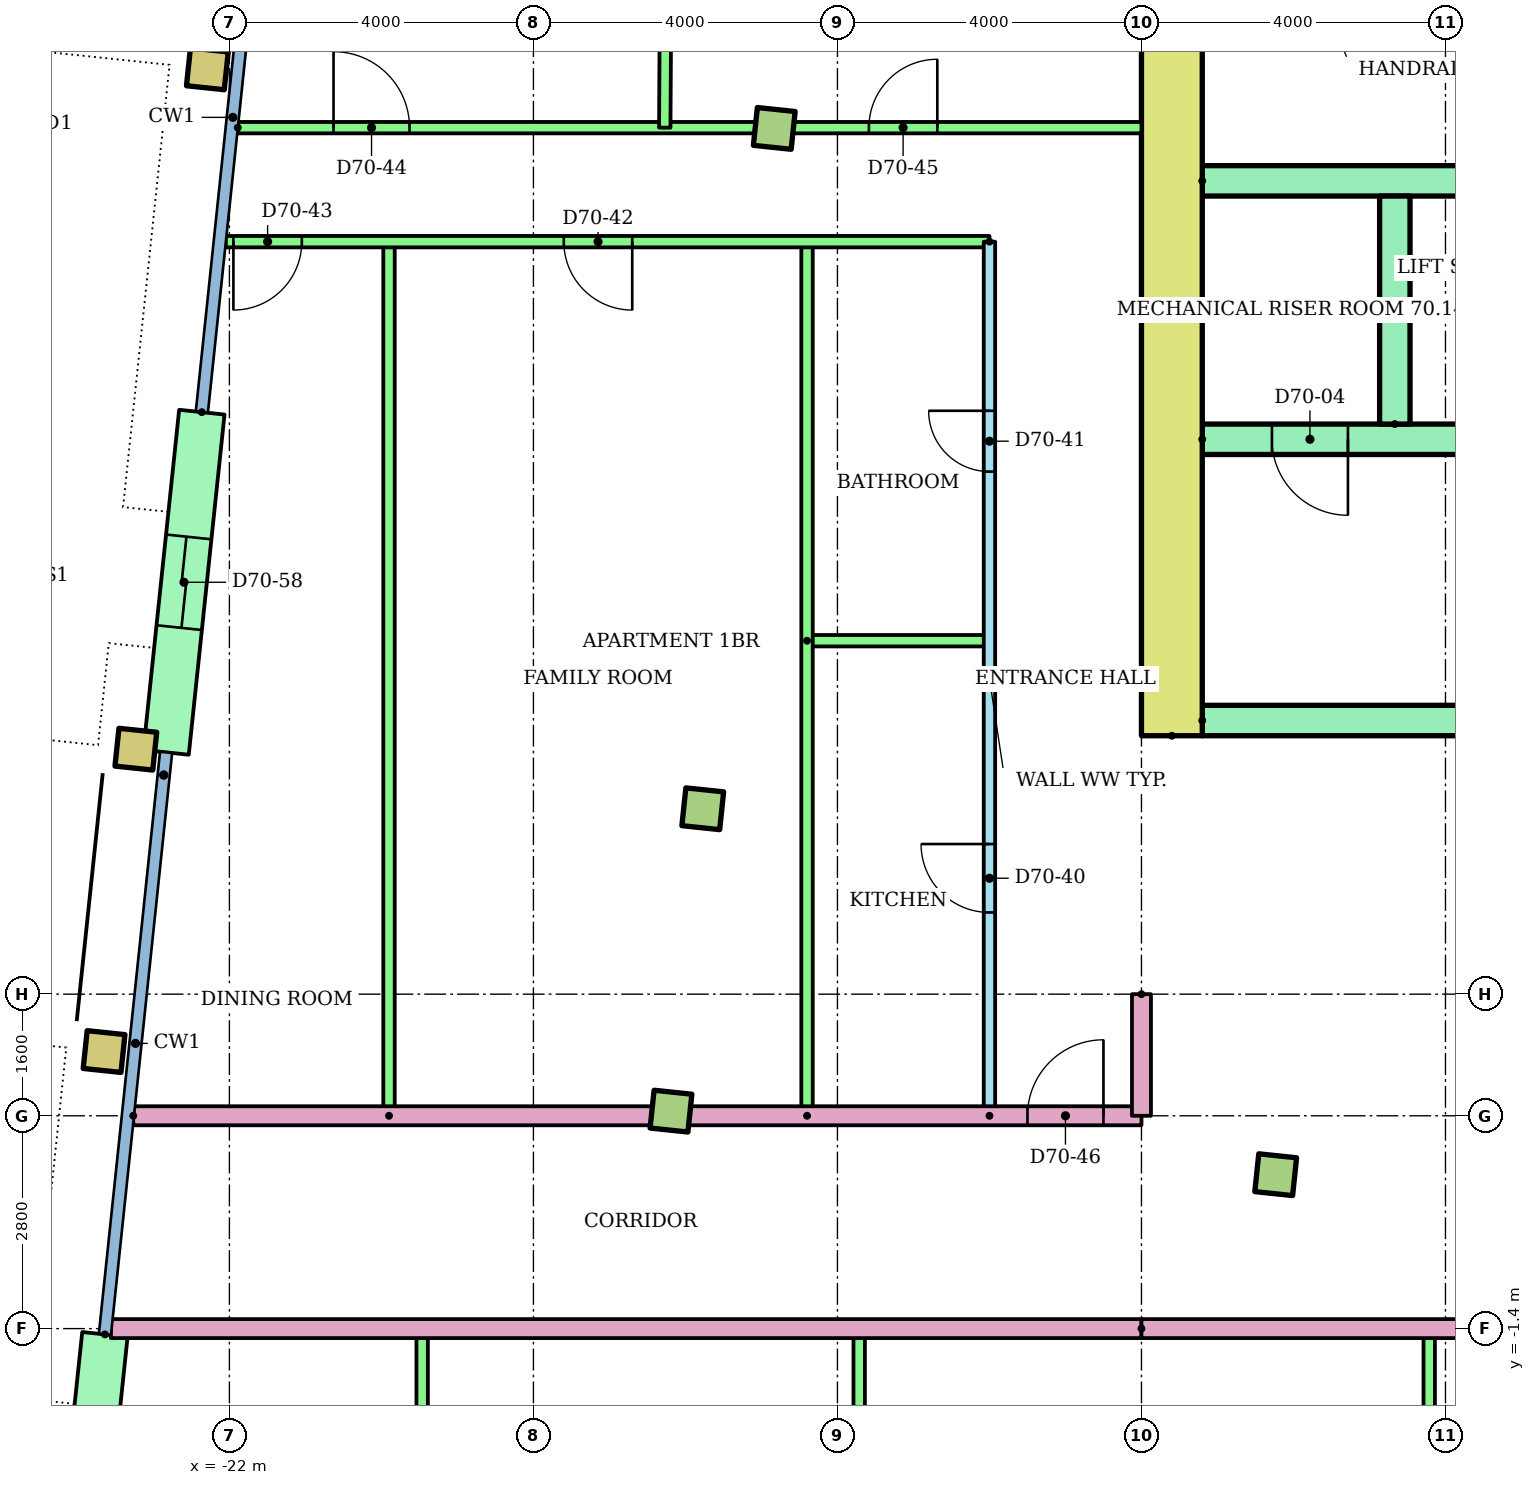
"""IFC4 building model, lengths in metres.
Left out: names, types, materials, properties, quantities, classifications, styles, units other than length and angle.
Written with IfcOpenShell. Run it as: python <this file> out.ifc"""

import sys

from ifc_helpers import new_model, si_unit, direction, frame, frame_2d, origin, origin_2d, place, context, subcontext, project, spatial, rectangle, hollow_rectangle, extrude, element, fill, save


model = new_model("IFC4")
c1 = context("Model", 3, precision=1e-05, world=origin(), true_north=direction((0.0, 1.0)))
c2 = subcontext(c1, "Body", "Model", "MODEL_VIEW")
j1 = project(units=[si_unit("LENGTHUNIT", "METRE"), si_unit("PLANEANGLEUNIT", "RADIAN")], contexts=[c1])
p1 = place(None, origin())
s1 = spatial("IfcSite", under=j1, at=p1, CompositionType="ELEMENT")
p2 = place(p1, origin())
s2 = spatial("IfcBuilding", under=s1, at=p2, CompositionType="ELEMENT")
p3 = place(p2, frame((0.0, 0.0, 269.1)))
s3 = spatial("IfcBuildingStorey", under=s2, at=p3, CompositionType="ELEMENT", Elevation=269.1)
p4 = place(p3, frame((-23.649, 2.245, 0.0), z_axis=(0.0, 0.0, 1.0), x_axis=(0.994521895368, -0.104528463268, 0.0)))
e1 = element("IfcColumn", 1, at=p4, inside=s3, PredefinedType="COLUMN", context=c2, shape_type="SweptSolid", body=[
    extrude(hollow_rectangle(XDim=0.5, YDim=0.5, WallThickness=0.025, at=origin_2d()), origin(), (0.0, 0.0, 1.0), 3.2),
])
for number, where, z_axis, x_axis in (
    (2, (-16.19, 1.461, 0.0), (0.0, 0.0, 1.0), (0.995, -0.105, 0.0)),
    (3, (-8.234, 0.625, 0.0), (0.0, 0.0, 1.0), (0.995, -0.105, 0.0)),
):
    element("IfcColumn", number, at=place(p3, frame(where, z_axis=z_axis, x_axis=x_axis)), inside=s3, PredefinedType="COLUMN", context=c2, shape_type="SweptSolid", body=[
        extrude(rectangle(XDim=0.5, YDim=0.5, at=origin_2d()), origin(), (0.0, 0.0, 1.0), 3.2),
    ])
p5 = place(p3, frame((-23.231, 6.223, 0.0), z_axis=(0.0, 0.0, 1.0), x_axis=(0.994521895368, -0.104528463268, 0.0)))
e4 = element("IfcColumn", 4, at=p5, inside=s3, PredefinedType="COLUMN", context=c2, shape_type="SweptSolid", body=[
    extrude(hollow_rectangle(XDim=0.5, YDim=0.5, WallThickness=0.025, at=origin_2d()), origin(), (0.0, 0.0, 1.0), 3.2),
])
p6 = place(p3, frame((-15.772, 5.439, 0.0), z_axis=(0.0, 0.0, 1.0), x_axis=(0.994521895368, -0.104528463268, 0.0)))
e5 = element("IfcColumn", 5, at=p6, inside=s3, PredefinedType="COLUMN", context=c2, shape_type="SweptSolid", body=[
    extrude(rectangle(XDim=0.5, YDim=0.5, at=origin_2d()), origin(), (0.0, 0.0, 1.0), 3.2),
])
p7 = place(p3, frame((-22.29, 15.174, 0.0), z_axis=(0.0, 0.0, 1.0), x_axis=(0.994521895368, -0.104528463268, 0.0)))
e6 = element("IfcColumn", 6, at=p7, inside=s3, PredefinedType="COLUMN", context=c2, shape_type="SweptSolid", body=[
    extrude(hollow_rectangle(XDim=0.5, YDim=0.5, WallThickness=0.025, at=origin_2d()), origin(), (0.0, 0.0, 1.0), 3.2),
])
p8 = place(p3, frame((-14.831, 14.39, 0.0), z_axis=(0.0, 0.0, 1.0), x_axis=(0.994521895368, -0.104528463268, 0.0)))
e7 = element("IfcColumn", 7, at=p8, inside=s3, PredefinedType="COLUMN", context=c2, shape_type="SweptSolid", body=[
    extrude(rectangle(XDim=0.5, YDim=0.5, at=origin_2d()), origin(), (0.0, 0.0, 1.0), 3.2),
])
p9 = place(p3, frame((-22.363, 10.657, 0.0), z_axis=(0.0, 0.0, 1.0), x_axis=(-0.104492739125, -0.994525649478, 0.0)))
e8 = element("IfcWall", 8, at=p9, inside=s3, PredefinedType="STANDARD", context=c2, shape_type="SweptSolid", body=[
    extrude(rectangle(XDim=4.5, YDim=0.6, at=frame_2d((2.25, 0.0))), origin(), (0.0, 0.0, 1.0), 2.92),
])
p10 = place(p9, frame((1.65, 0.0, 0.0)))
e9 = element("IfcOpeningElement", 9, at=p10, cuts=e8, PredefinedType="OPENING", context=c2, shape_type="SweptSolid", body=[
    extrude(rectangle(XDim=1.2, YDim=2.1, at=frame_2d((0.6, 1.05))), frame((0.0, 0.31, 0.0), z_axis=(0.0, -1.0, 0.0), x_axis=(1.0, 0.0, 0.0)), (0.0, 0.0, 1.0), 0.62),
])
p11 = place(p3, frame((-23.638, -1.476, 0.0), z_axis=(0.0, 0.0, 1.0), x_axis=(-0.104513052986, -0.994523514933, 0.0)))
e10 = element("IfcWall", 10, at=p11, inside=s3, PredefinedType="STANDARD", context=c2, shape_type="SweptSolid", body=[
    extrude(rectangle(XDim=3.7, YDim=0.6, at=frame_2d((1.85, 0.0))), origin(), (0.0, 0.0, 1.0), 2.92),
])
p12 = place(p11, frame((1.25, 0.0, 0.0)))
e11 = element("IfcOpeningElement", 11, at=p12, cuts=e10, PredefinedType="OPENING", context=c2, shape_type="SweptSolid", body=[
    extrude(rectangle(XDim=1.2, YDim=2.1, at=frame_2d((0.6, 1.05))), frame((0.0, 0.31, 0.0), z_axis=(0.0, -1.0, 0.0), x_axis=(1.0, 0.0, 0.0)), (0.0, 0.0, 1.0), 0.62),
])
p13 = place(p3, frame((-9.6, 6.4, 0.0), z_axis=(0.0, 0.0, 1.0), x_axis=(0.0, 1.0, 0.0)))
e12 = element("IfcWall", 12, at=p13, inside=s3, PredefinedType="SHEAR", context=c2, shape_type="SweptSolid", body=[
    extrude(rectangle(XDim=13.6, YDim=0.8, at=frame_2d((6.8, 0.0))), origin(), (0.0, 0.0, 1.0), 2.92),
])
p14 = place(p3, frame((-9.2, 6.6, 0.0)))
e13 = element("IfcWall", 13, at=p14, inside=s3, PredefinedType="SHEAR", context=c2, shape_type="SweptSolid", body=[
    extrude(rectangle(XDim=18.4, YDim=0.4, at=frame_2d((9.2, 0.0))), origin(), (0.0, 0.0, 1.0), 2.92),
])
p15 = place(p14, frame((8.3, 0.0, 0.0)))
e14 = element("IfcOpeningElement", 14, at=p15, cuts=e13, PredefinedType="OPENING", context=c2, shape_type="SweptSolid", body=[
    extrude(rectangle(XDim=1.8, YDim=2.1, at=frame_2d((0.9, 1.05))), frame((0.0, 0.21, 0.0), z_axis=(0.0, -1.0, 0.0), x_axis=(1.0, 0.0, 0.0)), (0.0, 0.0, 1.0), 0.42),
])
p16 = place(p14, frame((3.8, 0.0, 0.0)))
e15 = element("IfcOpeningElement", 15, at=p16, cuts=e13, PredefinedType="OPENING", context=c2, shape_type="SweptSolid", body=[
    extrude(rectangle(XDim=1.8, YDim=2.1, at=frame_2d((0.9, 1.05))), frame((0.0, 0.21, 0.0), z_axis=(0.0, -1.0, 0.0), x_axis=(1.0, 0.0, 0.0)), (0.0, 0.0, 1.0), 0.42),
])
p17 = place(p14, frame((12.8, 0.0, 0.0)))
e16 = element("IfcOpeningElement", 16, at=p17, cuts=e13, PredefinedType="OPENING", context=c2, shape_type="SweptSolid", body=[
    extrude(rectangle(XDim=1.8, YDim=2.1, at=frame_2d((0.9, 1.05))), frame((0.0, 0.21, 0.0), z_axis=(0.0, -1.0, 0.0), x_axis=(1.0, 0.0, 0.0)), (0.0, 0.0, 1.0), 0.42),
])
p18 = place(p3, frame((-9.2, 10.3, 0.0)))
e17 = element("IfcWall", 17, at=p18, inside=s3, PredefinedType="SHEAR", context=c2, shape_type="SweptSolid", body=[
    extrude(rectangle(XDim=8.0, YDim=0.4, at=frame_2d((4.0, 0.0))), origin(), (0.0, 0.0, 1.0), 2.92),
])
p19 = place(p18, frame((3.35, 0.0, 0.0)))
e18 = element("IfcOpeningElement", 18, at=p19, cuts=e17, PredefinedType="OPENING", context=c2, shape_type="SweptSolid", body=[
    extrude(rectangle(XDim=1.1, YDim=2.1, at=frame_2d((0.55, 1.05))), frame((0.0, 0.21, 0.0), z_axis=(0.0, -1.0, 0.0), x_axis=(1.0, 0.0, 0.0)), (0.0, 0.0, 1.0), 0.42),
])
p20 = place(p18, frame((6.083, 0.0, 0.0)))
e19 = element("IfcOpeningElement", 19, at=p20, cuts=e17, PredefinedType="OPENING", context=c2, shape_type="SweptSolid", body=[
    extrude(rectangle(XDim=1.1, YDim=2.1, at=frame_2d((0.55, 1.05))), frame((0.0, 0.21, 0.0), z_axis=(0.0, -1.0, 0.0), x_axis=(1.0, 0.0, 0.0)), (0.0, 0.0, 1.0), 0.42),
])
p21 = place(p18, frame((0.917, 0.0, 0.0)))
e20 = element("IfcOpeningElement", 20, at=p21, cuts=e17, PredefinedType="OPENING", context=c2, shape_type="SweptSolid", body=[
    extrude(rectangle(XDim=1.0, YDim=2.1, at=frame_2d((0.5, 1.05))), frame((0.0, 0.21, 0.0), z_axis=(0.0, -1.0, 0.0), x_axis=(1.0, 0.0, 0.0)), (0.0, 0.0, 1.0), 0.42),
])
p22 = place(p3, frame((-9.2, 13.7, 0.0)))
e21 = element("IfcWall", 21, at=p22, inside=s3, PredefinedType="SHEAR", context=c2, shape_type="SweptSolid", body=[
    extrude(rectangle(XDim=8.0, YDim=0.4, at=frame_2d((4.0, 0.0))), origin(), (0.0, 0.0, 1.0), 2.92),
])
p23 = place(p3, frame((-6.667, 10.5, 0.0), z_axis=(0.0, 0.0, 1.0), x_axis=(0.0, 1.0, 0.0)))
e22 = element("IfcWall", 22, at=p23, inside=s3, PredefinedType="SHEAR", context=c2, shape_type="SweptSolid", body=[
    extrude(rectangle(XDim=3.0, YDim=0.4, at=frame_2d((1.5, 0.0))), origin(), (0.0, 0.0, 1.0), 2.92),
])
for number, where, z_axis, x_axis in (
    (23, (-6.214, -7.047, 0.0), (0.0, 0.0, 1.0), (0.0, 1.0, 0.0)),
    (24, (-13.714, -7.047, 0.0), (0.0, 0.0, 1.0), (0.0, 1.0, 0.0)),
    (25, (-19.464, -7.047, 0.0), (0.0, 0.0, 1.0), (0.0, 1.0, 0.0)),
):
    element("IfcWall", number, at=place(p3, frame(where, z_axis=z_axis, x_axis=x_axis)), inside=s3, PredefinedType="PARTITIONING", context=c2, shape_type="SweptSolid", body=[
        extrude(rectangle(XDim=5.647, YDim=0.15, at=frame_2d((2.823, 0.0))), origin(), (0.0, 0.0, 1.0), 2.4),
    ])
p24 = place(p3, frame((-10.0, -1.4, 0.0), z_axis=(0.0, 0.0, 1.0), x_axis=(-1.0, 0.0, 0.0)))
e26 = element("IfcWall", 26, at=p24, inside=s3, PredefinedType="PARTITIONING", context=c2, shape_type="SweptSolid", body=[
    extrude(rectangle(XDim=13.56, YDim=0.25, at=frame_2d((6.78, 0.0))), origin(), (0.0, 0.0, 1.0), 2.4),
])
p25 = place(p3, frame((-12.0, 1.4, 0.0), z_axis=(0.0, 0.0, 1.0), x_axis=(0.0, 1.0, 0.0)))
e27 = element("IfcWall", 27, at=p25, inside=s3, PredefinedType="PARTITIONING", context=c2, shape_type="SweptSolid", body=[
    extrude(rectangle(XDim=11.5, YDim=0.15, at=frame_2d((5.75, 0.0))), origin(), (0.0, 0.0, 1.0), 2.4),
])
p26 = place(p25, frame((2.675, 0.0, 0.0)))
e28 = element("IfcOpeningElement", 28, at=p26, cuts=e27, PredefinedType="OPENING", context=c2, shape_type="SweptSolid", body=[
    extrude(rectangle(XDim=0.9, YDim=2.1, at=frame_2d((0.45, 1.05))), frame((0.0, 0.085, 0.0), z_axis=(0.0, -1.0, 0.0), x_axis=(1.0, 0.0, 0.0)), (0.0, 0.0, 1.0), 0.17),
])
p27 = place(p25, frame((8.475, 0.0, 0.0)))
e29 = element("IfcOpeningElement", 29, at=p27, cuts=e27, PredefinedType="OPENING", context=c2, shape_type="SweptSolid", body=[
    extrude(rectangle(XDim=0.8, YDim=2.1, at=frame_2d((0.4, 1.05))), frame((0.0, 0.085, 0.0), z_axis=(0.0, -1.0, 0.0), x_axis=(1.0, 0.0, 0.0)), (0.0, 0.0, 1.0), 0.17),
])
p28 = place(p3, frame((-14.4, 7.65, 0.0)))
e30 = element("IfcWall", 30, at=p28, inside=s3, PredefinedType="PARTITIONING", context=c2, shape_type="SweptSolid", body=[
    extrude(rectangle(XDim=2.4, YDim=0.15, at=frame_2d((1.2, 0.0))), origin(), (0.0, 0.0, 1.0), 2.4),
])
for number, where, z_axis, x_axis in (
    (31, (-14.4, 1.4, 0.0), (0.0, 0.0, 1.0), (0.0, 1.0, 0.0)),
    (32, (-19.9, 1.4, 0.0), (0.0, 0.0, 1.0), (0.0, 1.0, 0.0)),
):
    element("IfcWall", number, at=place(p3, frame(where, z_axis=z_axis, x_axis=x_axis)), inside=s3, PredefinedType="PARTITIONING", context=c2, shape_type="SweptSolid", body=[
        extrude(rectangle(XDim=11.5, YDim=0.15, at=frame_2d((5.75, 0.0))), origin(), (0.0, 0.0, 1.0), 2.4),
    ])
p29 = place(p3, frame((-12.0, 12.9, 0.0), z_axis=(0.0, 0.0, 1.0), x_axis=(-1.0, 0.0, 0.0)))
e33 = element("IfcWall", 33, at=p29, inside=s3, PredefinedType="PARTITIONING", context=c2, shape_type="SweptSolid", body=[
    extrude(rectangle(XDim=10.047, YDim=0.15, at=frame_2d((5.024, 0.0))), origin(), (0.0, 0.0, 1.0), 2.4),
])
p30 = place(p29, frame((4.7, 0.0, 0.0)))
e34 = element("IfcOpeningElement", 34, at=p30, cuts=e33, PredefinedType="OPENING", context=c2, shape_type="SweptSolid", body=[
    extrude(rectangle(XDim=0.9, YDim=2.1, at=frame_2d((0.45, 1.05))), frame((0.0, 0.085, 0.0), z_axis=(0.0, -1.0, 0.0), x_axis=(1.0, 0.0, 0.0)), (0.0, 0.0, 1.0), 0.17),
])
p31 = place(p29, frame((9.047, 0.0, 0.0)))
e35 = element("IfcOpeningElement", 35, at=p31, cuts=e33, PredefinedType="OPENING", context=c2, shape_type="SweptSolid", body=[
    extrude(rectangle(XDim=0.9, YDim=2.1, at=frame_2d((0.45, 1.05))), frame((0.0, 0.085, 0.0), z_axis=(0.0, -1.0, 0.0), x_axis=(1.0, 0.0, 0.0)), (0.0, 0.0, 1.0), 0.17),
])
p32 = place(p3, frame((-21.89, 14.4, 0.0)))
e36 = element("IfcWall", 36, at=p32, inside=s3, PredefinedType="PARTITIONING", context=c2, shape_type="SweptSolid", body=[
    extrude(rectangle(XDim=11.89, YDim=0.15, at=frame_2d((5.945, 0.0))), origin(), (0.0, 0.0, 1.0), 2.4),
])
p33 = place(p32, frame((1.26, 0.0, 0.0)))
e37 = element("IfcOpeningElement", 37, at=p33, cuts=e36, PredefinedType="OPENING", context=c2, shape_type="SweptSolid", body=[
    extrude(rectangle(XDim=1.0, YDim=2.1, at=frame_2d((0.5, 1.05))), frame((0.0, 0.085, 0.0), z_axis=(0.0, -1.0, 0.0), x_axis=(1.0, 0.0, 0.0)), (0.0, 0.0, 1.0), 0.17),
])
p34 = place(p32, frame((8.304, 0.0, 0.0)))
e38 = element("IfcOpeningElement", 38, at=p34, cuts=e36, PredefinedType="OPENING", context=c2, shape_type="SweptSolid", body=[
    extrude(rectangle(XDim=0.9, YDim=2.1, at=frame_2d((0.45, 1.05))), frame((0.0, 0.085, 0.0), z_axis=(0.0, -1.0, 0.0), x_axis=(1.0, 0.0, 0.0)), (0.0, 0.0, 1.0), 0.17),
])
p35 = place(p3, frame((-16.222, 22.61, 0.0), z_axis=(0.0, 0.0, 1.0), x_axis=(-0.006095634594, -0.999981421447, 0.0)))
e39 = element("IfcWall", 39, at=p35, inside=s3, PredefinedType="PARTITIONING", context=c2, shape_type="SweptSolid", body=[
    extrude(rectangle(XDim=8.211, YDim=0.15, at=frame_2d((4.105, 0.0))), origin(), (0.0, 0.0, 1.0), 2.4),
])
p36 = place(p3, frame((-23.265, 1.4, 0.0)))
e40 = element("IfcWall", 40, at=p36, inside=s3, PredefinedType="PARTITIONING", context=c2, shape_type="SweptSolid", body=[
    extrude(rectangle(XDim=13.265, YDim=0.25, at=frame_2d((6.633, 0.0))), origin(), (0.0, 0.0, 1.0), 2.4),
])
p37 = place(p36, frame((11.765, 0.0, 0.0)))
e41 = element("IfcOpeningElement", 41, at=p37, cuts=e40, PredefinedType="OPENING", context=c2, shape_type="SweptSolid", body=[
    extrude(rectangle(XDim=1.0, YDim=2.1, at=frame_2d((0.5, 1.05))), frame((0.0, 0.135, 0.0), z_axis=(0.0, -1.0, 0.0), x_axis=(1.0, 0.0, 0.0)), (0.0, 0.0, 1.0), 0.27),
])
p38 = place(p3, frame((10.0, -1.4, 0.0), z_axis=(0.0, 0.0, 1.0), x_axis=(-1.0, 0.0, 0.0)))
e42 = element("IfcWall", 42, at=p38, inside=s3, PredefinedType="PARTITIONING", context=c2, shape_type="SweptSolid", body=[
    extrude(rectangle(XDim=20.0, YDim=0.25, at=frame_2d((10.0, 0.0))), origin(), (0.0, 0.0, 1.0), 2.4),
])
p39 = place(p38, frame((12.314, 0.0, 0.0)))
e43 = element("IfcOpeningElement", 43, at=p39, cuts=e42, PredefinedType="OPENING", context=c2, shape_type="SweptSolid", body=[
    extrude(rectangle(XDim=1.0, YDim=2.1, at=frame_2d((0.5, 1.05))), frame((0.0, 0.135, 0.0), z_axis=(0.0, -1.0, 0.0), x_axis=(1.0, 0.0, 0.0)), (0.0, 0.0, 1.0), 0.27),
])
p40 = place(p38, frame((10.57, 0.0, 0.0)))
e44 = element("IfcOpeningElement", 44, at=p40, cuts=e42, PredefinedType="OPENING", context=c2, shape_type="SweptSolid", body=[
    extrude(rectangle(XDim=0.9, YDim=2.1, at=frame_2d((0.45, 1.05))), frame((0.0, 0.135, 0.0), z_axis=(0.0, -1.0, 0.0), x_axis=(1.0, 0.0, 0.0)), (0.0, 0.0, 1.0), 0.27),
])
p41 = place(p3, frame((-10.0, 3.0, 0.0), z_axis=(0.0, 0.0, 1.0), x_axis=(0.0, -1.0, 0.0)))
e45 = element("IfcWall", 45, at=p41, inside=s3, PredefinedType="PARTITIONING", context=c2, shape_type="SweptSolid", body=[
    extrude(rectangle(XDim=1.6, YDim=0.25, at=frame_2d((0.8, 0.0))), origin(), (0.0, 0.0, 1.0), 2.4),
])
p42 = place(p21, frame((1.0, 0.0, 0.0), z_axis=(0.0, 0.0, 1.0), x_axis=(-1.0, 0.0, 0.0)))
e46 = element("IfcDoor", 46, at=p42, inside=s3, OperationType="SINGLE_SWING_RIGHT", PredefinedType="DOOR", context=c2, shape_type="SweptSolid", body=[
    extrude(rectangle(XDim=1.0, YDim=2.1, at=frame_2d((0.5, 1.05))), frame((0.0, 0.025, 0.0), z_axis=(0.0, -1.0, 0.0), x_axis=(1.0, 0.0, 0.0)), (0.0, 0.0, 1.0), 0.05),
])
fill(e20, e46)
p43 = place(p26, origin())
e47 = element("IfcDoor", 47, at=p43, inside=s3, OperationType="SINGLE_SWING_RIGHT", PredefinedType="DOOR", context=c2, shape_type="SweptSolid", body=[
    extrude(rectangle(XDim=0.9, YDim=2.1, at=frame_2d((0.45, 1.05))), frame((0.0, 0.025, 0.0), z_axis=(0.0, -1.0, 0.0), x_axis=(1.0, 0.0, 0.0)), (0.0, 0.0, 1.0), 0.05),
])
fill(e28, e47)
p44 = place(p27, origin())
e48 = element("IfcDoor", 48, at=p44, inside=s3, OperationType="SINGLE_SWING_RIGHT", PredefinedType="DOOR", context=c2, shape_type="SweptSolid", body=[
    extrude(rectangle(XDim=0.8, YDim=2.1, at=frame_2d((0.4, 1.05))), frame((0.0, 0.025, 0.0), z_axis=(0.0, -1.0, 0.0), x_axis=(1.0, 0.0, 0.0)), (0.0, 0.0, 1.0), 0.05),
])
fill(e29, e48)
p45 = place(p30, origin())
e49 = element("IfcDoor", 49, at=p45, inside=s3, OperationType="SINGLE_SWING_LEFT", PredefinedType="DOOR", context=c2, shape_type="SweptSolid", body=[
    extrude(rectangle(XDim=0.9, YDim=2.1, at=frame_2d((0.45, 1.05))), frame((0.0, 0.025, 0.0), z_axis=(0.0, -1.0, 0.0), x_axis=(1.0, 0.0, 0.0)), (0.0, 0.0, 1.0), 0.05),
])
fill(e34, e49)
p46 = place(p31, origin())
e50 = element("IfcDoor", 50, at=p46, inside=s3, OperationType="SINGLE_SWING_RIGHT", PredefinedType="DOOR", context=c2, shape_type="SweptSolid", body=[
    extrude(rectangle(XDim=0.9, YDim=2.1, at=frame_2d((0.45, 1.05))), frame((0.0, 0.025, 0.0), z_axis=(0.0, -1.0, 0.0), x_axis=(1.0, 0.0, 0.0)), (0.0, 0.0, 1.0), 0.05),
])
fill(e35, e50)
p47 = place(p33, origin())
e51 = element("IfcDoor", 51, at=p47, inside=s3, OperationType="SINGLE_SWING_LEFT", PredefinedType="DOOR", context=c2, shape_type="SweptSolid", body=[
    extrude(rectangle(XDim=1.0, YDim=2.1, at=frame_2d((0.5, 1.05))), frame((0.0, 0.025, 0.0), z_axis=(0.0, -1.0, 0.0), x_axis=(1.0, 0.0, 0.0)), (0.0, 0.0, 1.0), 0.05),
])
fill(e37, e51)
p48 = place(p34, origin())
e52 = element("IfcDoor", 52, at=p48, inside=s3, OperationType="SINGLE_SWING_RIGHT", PredefinedType="DOOR", context=c2, shape_type="SweptSolid", body=[
    extrude(rectangle(XDim=0.9, YDim=2.1, at=frame_2d((0.45, 1.05))), frame((0.0, 0.025, 0.0), z_axis=(0.0, -1.0, 0.0), x_axis=(1.0, 0.0, 0.0)), (0.0, 0.0, 1.0), 0.05),
])
fill(e38, e52)
p49 = place(p37, origin())
e53 = element("IfcDoor", 53, at=p49, inside=s3, OperationType="SINGLE_SWING_RIGHT", PredefinedType="DOOR", context=c2, shape_type="SweptSolid", body=[
    extrude(rectangle(XDim=1.0, YDim=2.1, at=frame_2d((0.5, 1.05))), frame((0.0, 0.025, 0.0), z_axis=(0.0, -1.0, 0.0), x_axis=(1.0, 0.0, 0.0)), (0.0, 0.0, 1.0), 0.05),
])
fill(e41, e53)
p50 = place(p10, origin())
e54 = element("IfcDoor", 54, at=p50, inside=s3, OperationType="SLIDING_TO_LEFT", PredefinedType="DOOR", context=c2, shape_type="SweptSolid", body=[
    extrude(rectangle(XDim=1.2, YDim=2.1, at=frame_2d((0.6, 1.05))), frame((0.0, 0.025, 0.0), z_axis=(0.0, -1.0, 0.0), x_axis=(1.0, 0.0, 0.0)), (0.0, 0.0, 1.0), 0.05),
])
fill(e9, e54)
save(model, sys.argv[1])
